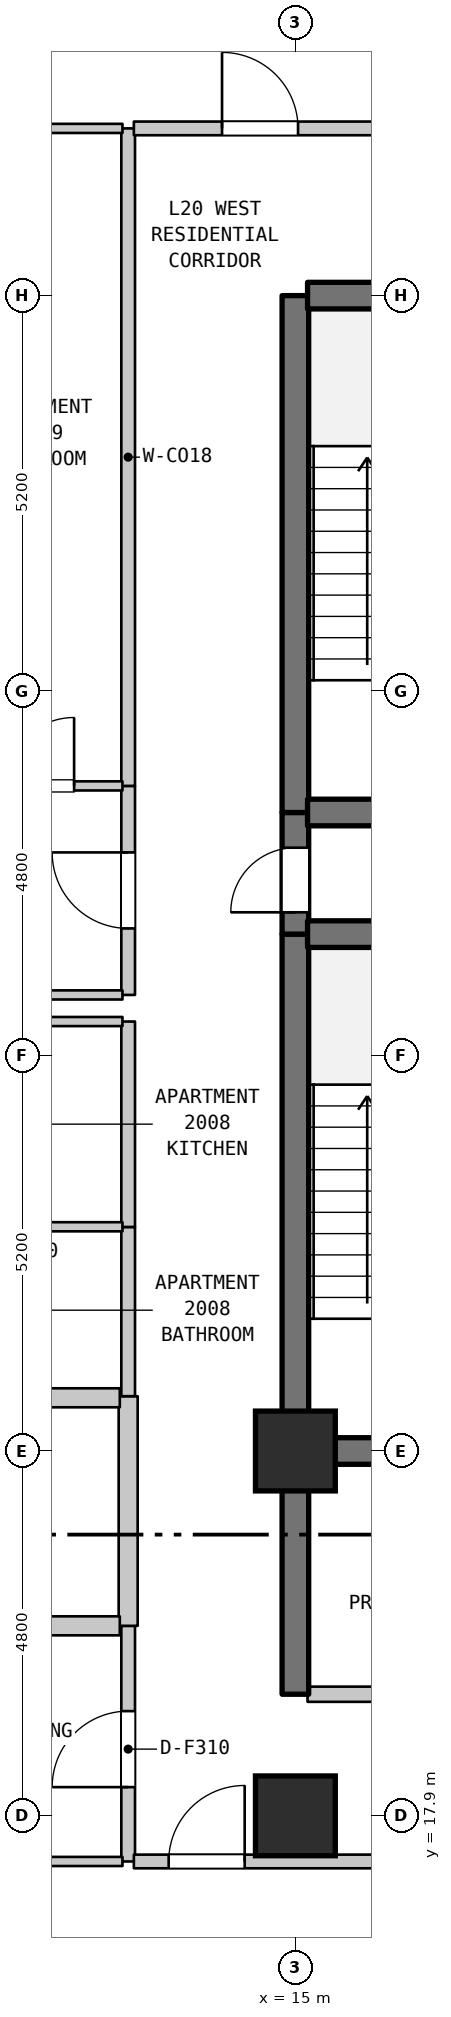
"""IFC4 building model, lengths in metres.
Left out: names, types, materials, properties, quantities, classifications, styles, units other than length and angle.
Written with IfcOpenShell. Run it as: python <this file> out.ifc"""

import sys

from ifc_helpers import new_model, si_unit, direction, frame, frame_2d, origin, origin_2d, place, context, subcontext, project, spatial, rectangle, extrude, element, fill, save


model = new_model("IFC4")
c1 = context("Model", 3, precision=1e-05, world=origin(), true_north=direction((0.0, 1.0)))
c2 = subcontext(c1, "Body", "Model", "MODEL_VIEW")
j1 = project(units=[si_unit("LENGTHUNIT", "METRE"), si_unit("PLANEANGLEUNIT", "RADIAN")], contexts=[c1])
p1 = place(None, origin())
s1 = spatial("IfcSite", under=j1, at=p1, CompositionType="ELEMENT")
p2 = place(p1, origin())
s2 = spatial("IfcBuilding", under=s1, at=p2, CompositionType="ELEMENT")
p3 = place(p2, frame((0.0, 0.0, 86.4)))
s3 = spatial("IfcBuildingStorey", under=s2, at=p3, CompositionType="ELEMENT", Elevation=86.4)
for number, where, z_axis, x_axis in (
    (1, (15.0, 17.9, 0.0), (0.0, 0.0, 1.0), (1.0, 0.0, 0.0)),
    (2, (15.0, 22.7, 0.0), (0.0, 0.0, 1.0), (1.0, 0.0, 0.0)),
):
    element("IfcColumn", number, at=place(p3, frame(where, z_axis=z_axis, x_axis=x_axis)), inside=s3, PredefinedType="COLUMN", context=c2, shape_type="SweptSolid", body=[
        extrude(rectangle(XDim=1.05, YDim=1.05, at=origin_2d()), origin(), (0.0, 0.0, 1.0), 4.5),
    ])
p4 = place(p3, frame((12.8, 17.3, 0.0), z_axis=(0.0, 0.0, 1.0), x_axis=(0.0, 1.0, 0.0)))
e3 = element("IfcWall", 3, at=p4, inside=s3, PredefinedType="STANDARD", context=c2, shape_type="SweptSolid", body=[
    extrude(rectangle(XDim=3.1, YDim=0.18, at=frame_2d((1.55, 0.0))), origin(), (0.0, 0.0, 1.0), 4.185),
])
p5 = place(p4, frame((0.978, 0.0, 0.0)))
e4 = element("IfcOpeningElement", 4, at=p5, cuts=e3, PredefinedType="OPENING", context=c2, shape_type="SweptSolid", body=[
    extrude(rectangle(XDim=1.0, YDim=2.15, at=frame_2d((0.5, 1.075))), frame((0.0, 0.1, 0.0), z_axis=(0.0, -1.0, 0.0), x_axis=(1.0, 0.0, 0.0)), (0.0, 0.0, 1.0), 0.2),
])
p6 = place(p3, frame((12.8, 20.4, 0.0), z_axis=(0.0, 0.0, 1.0), x_axis=(0.0, 1.0, 0.0)))
e5 = element("IfcWall", 5, at=p6, inside=s3, PredefinedType="STANDARD", context=c2, shape_type="SweptSolid", body=[
    extrude(rectangle(XDim=3.021, YDim=0.25, at=frame_2d((1.51, 0.0))), origin(), (0.0, 0.0, 1.0), 4.185),
])
p7 = place(p3, frame((12.8, 23.421, 0.0), z_axis=(0.0, 0.0, 1.0), x_axis=(0.0, 1.0, 0.0)))
e6 = element("IfcWall", 6, at=p7, inside=s3, PredefinedType="STANDARD", context=c2, shape_type="SweptSolid", body=[
    extrude(rectangle(XDim=2.226, YDim=0.18, at=frame_2d((1.113, 0.0))), origin(), (0.0, 0.0, 1.0), 4.185),
])
p8 = place(p3, frame((12.8, 25.647, 0.0), z_axis=(0.0, 0.0, 1.0), x_axis=(0.0, 1.0, 0.0)))
e7 = element("IfcWall", 7, at=p8, inside=s3, PredefinedType="STANDARD", context=c2, shape_type="SweptSolid", body=[
    extrude(rectangle(XDim=2.703, YDim=0.18, at=frame_2d((1.352, 0.0))), origin(), (0.0, 0.0, 1.0), 4.185),
])
p9 = place(p3, frame((12.8, 28.7, 0.0), z_axis=(0.0, 0.0, 1.0), x_axis=(0.0, 1.0, 0.0)))
e8 = element("IfcWall", 8, at=p9, inside=s3, PredefinedType="STANDARD", context=c2, shape_type="SweptSolid", body=[
    extrude(rectangle(XDim=2.75, YDim=0.18, at=frame_2d((1.375, 0.0))), origin(), (0.0, 0.0, 1.0), 4.185),
])
p10 = place(p9, frame((0.875, 0.0, 0.0)))
e9 = element("IfcOpeningElement", 9, at=p10, cuts=e8, PredefinedType="OPENING", context=c2, shape_type="SweptSolid", body=[
    extrude(rectangle(XDim=1.0, YDim=2.15, at=frame_2d((0.5, 1.075))), frame((0.0, 0.1, 0.0), z_axis=(0.0, -1.0, 0.0), x_axis=(1.0, 0.0, 0.0)), (0.0, 0.0, 1.0), 0.2),
])
p11 = place(p3, frame((12.8, 31.45, 0.0), z_axis=(0.0, 0.0, 1.0), x_axis=(0.0, 1.0, 0.0)))
e10 = element("IfcWall", 10, at=p11, inside=s3, PredefinedType="STANDARD", context=c2, shape_type="SweptSolid", body=[
    extrude(rectangle(XDim=8.65, YDim=0.18, at=frame_2d((4.325, 0.0))), origin(), (0.0, 0.0, 1.0), 4.185),
])
p12 = place(p3, frame((15.0, 19.5, 0.0), z_axis=(0.0, 0.0, 1.0), x_axis=(0.0, 1.0, 0.0)))
e11 = element("IfcWall", 11, at=p12, inside=s3, PredefinedType="SHEAR", context=c2, shape_type="SweptSolid", body=[
    extrude(rectangle(XDim=3.2, YDim=0.35, at=frame_2d((1.6, 0.0))), origin(), (0.0, 0.0, 1.0), 4.185),
])
p13 = place(p3, frame((15.0, 22.7, 0.0), z_axis=(0.0, 0.0, 1.0), x_axis=(0.0, 1.0, 0.0)))
e12 = element("IfcWall", 12, at=p13, inside=s3, PredefinedType="SHEAR", context=c2, shape_type="SweptSolid", body=[
    extrude(rectangle(XDim=6.8, YDim=0.35, at=frame_2d((3.4, 0.0))), origin(), (0.0, 0.0, 1.0), 4.185),
])
p14 = place(p3, frame((15.0, 29.5, 0.0), z_axis=(0.0, 0.0, 1.0), x_axis=(0.0, 1.0, 0.0)))
e13 = element("IfcWall", 13, at=p14, inside=s3, PredefinedType="SHEAR", context=c2, shape_type="SweptSolid", body=[
    extrude(rectangle(XDim=1.6, YDim=0.35, at=frame_2d((0.8, 0.0))), origin(), (0.0, 0.0, 1.0), 4.185),
])
p15 = place(p14, frame((0.287, 0.0, 0.0)))
e14 = element("IfcOpeningElement", 14, at=p15, cuts=e13, PredefinedType="OPENING", context=c2, shape_type="SweptSolid", body=[
    extrude(rectangle(XDim=0.85, YDim=2.1, at=frame_2d((0.425, 1.05))), frame((0.0, 0.185, 0.0), z_axis=(0.0, -1.0, 0.0), x_axis=(1.0, 0.0, 0.0)), (0.0, 0.0, 1.0), 0.37),
])
p16 = place(p3, frame((15.0, 31.1, 0.0), z_axis=(0.0, 0.0, 1.0), x_axis=(0.0, 1.0, 0.0)))
e15 = element("IfcWall", 15, at=p16, inside=s3, PredefinedType="SHEAR", context=c2, shape_type="SweptSolid", body=[
    extrude(rectangle(XDim=6.8, YDim=0.35, at=frame_2d((3.4, 0.0))), origin(), (0.0, 0.0, 1.0), 4.185),
])
p17 = place(p3, frame((9.085, 17.3, 0.0), z_axis=(0.0, 0.0, 1.0), x_axis=(1.0, 0.0, 0.0)))
e16 = element("IfcWall", 16, at=p17, inside=s3, PredefinedType="PARTITIONING", context=c2, shape_type="SweptSolid", body=[
    extrude(rectangle(XDim=3.64, YDim=0.12, at=frame_2d((1.82, 0.0))), origin(), (0.0, 0.0, 1.0), 4.185),
])
p18 = place(p3, frame((12.875, 17.3, 0.0), z_axis=(0.0, 0.0, 1.0), x_axis=(1.0, 0.0, 0.0)))
e17 = element("IfcWall", 17, at=p18, inside=s3, PredefinedType="STANDARD", context=c2, shape_type="SweptSolid", body=[
    extrude(rectangle(XDim=3.78, YDim=0.18, at=frame_2d((1.89, 0.0))), origin(), (0.0, 0.0, 1.0), 4.185),
])
p19 = place(p18, frame((0.458, 0.0, 0.0)))
e18 = element("IfcOpeningElement", 18, at=p19, cuts=e17, PredefinedType="OPENING", context=c2, shape_type="SweptSolid", body=[
    extrude(rectangle(XDim=1.0, YDim=2.15, at=frame_2d((0.5, 1.075))), frame((0.0, 0.1, 0.0), z_axis=(0.0, -1.0, 0.0), x_axis=(1.0, 0.0, 0.0)), (0.0, 0.0, 1.0), 0.2),
])
p20 = place(p3, frame((15.16, 19.5, 0.0), z_axis=(0.0, 0.0, 1.0), x_axis=(1.0, 0.0, 0.0)))
e19 = element("IfcWall", 19, at=p20, inside=s3, PredefinedType="STANDARD", context=c2, shape_type="SweptSolid", body=[
    extrude(rectangle(XDim=3.68, YDim=0.2, at=frame_2d((1.84, 0.0))), origin(), (0.0, 0.0, 1.0), 4.185),
])
p21 = place(p20, frame((1.39, 0.0, 0.0)))
e20 = element("IfcOpeningElement", 20, at=p21, cuts=e19, PredefinedType="OPENING", context=c2, shape_type="SweptSolid", body=[
    extrude(rectangle(XDim=0.9, YDim=2.15, at=frame_2d((0.45, 1.075))), frame((0.0, 0.11, 0.0), z_axis=(0.0, -1.0, 0.0), x_axis=(1.0, 0.0, 0.0)), (0.0, 0.0, 1.0), 0.22),
])
p22 = place(p3, frame((10.66, 20.4, 0.0), z_axis=(0.0, 0.0, 1.0), x_axis=(1.0, 0.0, 0.0)))
e21 = element("IfcWall", 21, at=p22, inside=s3, PredefinedType="STANDARD", context=c2, shape_type="SweptSolid", body=[
    extrude(rectangle(XDim=2.03, YDim=0.25, at=frame_2d((1.015, 0.0))), origin(), (0.0, 0.0, 1.0), 4.185),
])
p23 = place(p3, frame((15.16, 22.7, 0.0), z_axis=(0.0, 0.0, 1.0), x_axis=(1.0, 0.0, 0.0)))
e22 = element("IfcWall", 22, at=p23, inside=s3, PredefinedType="SHEAR", context=c2, shape_type="SweptSolid", body=[
    extrude(rectangle(XDim=3.68, YDim=0.35, at=frame_2d((1.84, 0.0))), origin(), (0.0, 0.0, 1.0), 4.185),
])
p24 = place(p3, frame((10.66, 23.4, 0.0), z_axis=(0.0, 0.0, 1.0), x_axis=(1.0, 0.0, 0.0)))
e23 = element("IfcWall", 23, at=p24, inside=s3, PredefinedType="STANDARD", context=c2, shape_type="SweptSolid", body=[
    extrude(rectangle(XDim=2.03, YDim=0.25, at=frame_2d((1.015, 0.0))), origin(), (0.0, 0.0, 1.0), 4.185),
])
for number, where, z_axis, x_axis in (
    (24, (10.595, 25.65, 0.0), (0.0, 0.0, 1.0), (1.0, 0.0, 0.0)),
    (25, (10.595, 28.35, 0.0), (0.0, 0.0, 1.0), (1.0, 0.0, 0.0)),
):
    element("IfcWall", number, at=place(p3, frame(where, z_axis=z_axis, x_axis=x_axis)), inside=s3, PredefinedType="PARTITIONING", context=c2, shape_type="SweptSolid", body=[
        extrude(rectangle(XDim=2.13, YDim=0.12, at=frame_2d((1.065, 0.0))), origin(), (0.0, 0.0, 1.0), 4.185),
    ])
p25 = place(p3, frame((9.03, 28.7, 0.0), z_axis=(0.0, 0.0, 1.0), x_axis=(1.0, 0.0, 0.0)))
e26 = element("IfcWall", 26, at=p25, inside=s3, PredefinedType="PARTITIONING", context=c2, shape_type="SweptSolid", body=[
    extrude(rectangle(XDim=3.695, YDim=0.12, at=frame_2d((1.848, 0.0))), origin(), (0.0, 0.0, 1.0), 4.185),
])
for number, where, z_axis, x_axis in (
    (27, (15.16, 29.5, 0.0), (0.0, 0.0, 1.0), (1.0, 0.0, 0.0)),
    (28, (15.16, 31.1, 0.0), (0.0, 0.0, 1.0), (1.0, 0.0, 0.0)),
):
    element("IfcWall", number, at=place(p3, frame(where, z_axis=z_axis, x_axis=x_axis)), inside=s3, PredefinedType="SHEAR", context=c2, shape_type="SweptSolid", body=[
        extrude(rectangle(XDim=3.68, YDim=0.35, at=frame_2d((1.84, 0.0))), origin(), (0.0, 0.0, 1.0), 4.185),
    ])
p26 = place(p3, frame((10.523, 31.45, 0.0), z_axis=(0.0, 0.0, 1.0), x_axis=(1.0, 0.0, 0.0)))
e29 = element("IfcWall", 29, at=p26, inside=s3, PredefinedType="PARTITIONING", context=c2, shape_type="SweptSolid", body=[
    extrude(rectangle(XDim=2.202, YDim=0.12, at=frame_2d((1.101, 0.0))), origin(), (0.0, 0.0, 1.0), 4.185),
])
p27 = place(p26, frame((0.666, 0.0, 0.0)))
e30 = element("IfcOpeningElement", 30, at=p27, cuts=e29, PredefinedType="OPENING", context=c2, shape_type="SweptSolid", body=[
    extrude(rectangle(XDim=0.9, YDim=2.1, at=frame_2d((0.45, 1.05))), frame((0.0, 0.07, 0.0), z_axis=(0.0, -1.0, 0.0), x_axis=(1.0, 0.0, 0.0)), (0.0, 0.0, 1.0), 0.14),
])
p28 = place(p3, frame((15.16, 37.9, 0.0), z_axis=(0.0, 0.0, 1.0), x_axis=(1.0, 0.0, 0.0)))
e31 = element("IfcWall", 31, at=p28, inside=s3, PredefinedType="SHEAR", context=c2, shape_type="SweptSolid", body=[
    extrude(rectangle(XDim=3.68, YDim=0.35, at=frame_2d((1.84, 0.0))), origin(), (0.0, 0.0, 1.0), 4.185),
])
p29 = place(p3, frame((10.523, 40.1, 0.0), z_axis=(0.0, 0.0, 1.0), x_axis=(1.0, 0.0, 0.0)))
e32 = element("IfcWall", 32, at=p29, inside=s3, PredefinedType="PARTITIONING", context=c2, shape_type="SweptSolid", body=[
    extrude(rectangle(XDim=2.202, YDim=0.12, at=frame_2d((1.101, 0.0))), origin(), (0.0, 0.0, 1.0), 4.185),
])
p30 = place(p3, frame((12.875, 40.1, 0.0), z_axis=(0.0, 0.0, 1.0), x_axis=(1.0, 0.0, 0.0)))
e33 = element("IfcWall", 33, at=p30, inside=s3, PredefinedType="STANDARD", context=c2, shape_type="SweptSolid", body=[
    extrude(rectangle(XDim=3.49, YDim=0.18, at=frame_2d((1.745, 0.0))), origin(), (0.0, 0.0, 1.0), 4.185),
])
p31 = place(p30, frame((1.16, 0.0, 0.0)))
e34 = element("IfcOpeningElement", 34, at=p31, cuts=e33, PredefinedType="OPENING", context=c2, shape_type="SweptSolid", body=[
    extrude(rectangle(XDim=1.0, YDim=2.15, at=frame_2d((0.5, 1.075))), frame((0.0, 0.1, 0.0), z_axis=(0.0, -1.0, 0.0), x_axis=(1.0, 0.0, 0.0)), (0.0, 0.0, 1.0), 0.2),
])
p32 = place(p5, origin())
e35 = element("IfcDoor", 35, at=p32, inside=s3, OperationType="SINGLE_SWING_LEFT", PredefinedType="DOOR", context=c2, shape_type="SweptSolid", body=[
    extrude(rectangle(XDim=1.0, YDim=2.15, at=frame_2d((0.5, 1.075))), frame((0.0, 0.025, 0.0), z_axis=(0.0, -1.0, 0.0), x_axis=(1.0, 0.0, 0.0)), (0.0, 0.0, 1.0), 0.05),
])
fill(e4, e35)
p33 = place(p10, origin())
e36 = element("IfcDoor", 36, at=p33, inside=s3, OperationType="SINGLE_SWING_RIGHT", PredefinedType="DOOR", context=c2, shape_type="SweptSolid", body=[
    extrude(rectangle(XDim=1.0, YDim=2.15, at=frame_2d((0.5, 1.075))), frame((0.0, 0.025, 0.0), z_axis=(0.0, -1.0, 0.0), x_axis=(1.0, 0.0, 0.0)), (0.0, 0.0, 1.0), 0.05),
])
fill(e9, e36)
p34 = place(p15, origin())
e37 = element("IfcDoor", 37, at=p34, inside=s3, OperationType="SINGLE_SWING_LEFT", PredefinedType="DOOR", context=c2, shape_type="SweptSolid", body=[
    extrude(rectangle(XDim=0.85, YDim=2.1, at=frame_2d((0.425, 1.05))), frame((0.0, 0.025, 0.0), z_axis=(0.0, -1.0, 0.0), x_axis=(1.0, 0.0, 0.0)), (0.0, 0.0, 1.0), 0.05),
])
fill(e14, e37)
p35 = place(p19, origin())
e38 = element("IfcDoor", 38, at=p35, inside=s3, OperationType="SINGLE_SWING_RIGHT", PredefinedType="DOOR", context=c2, shape_type="SweptSolid", body=[
    extrude(rectangle(XDim=1.0, YDim=2.15, at=frame_2d((0.5, 1.075))), frame((0.0, 0.025, 0.0), z_axis=(0.0, -1.0, 0.0), x_axis=(1.0, 0.0, 0.0)), (0.0, 0.0, 1.0), 0.05),
])
fill(e18, e38)
p36 = place(p27, origin())
e39 = element("IfcDoor", 39, at=p36, inside=s3, OperationType="SINGLE_SWING_RIGHT", PredefinedType="DOOR", context=c2, shape_type="SweptSolid", body=[
    extrude(rectangle(XDim=0.9, YDim=2.1, at=frame_2d((0.45, 1.05))), frame((0.0, 0.025, 0.0), z_axis=(0.0, -1.0, 0.0), x_axis=(1.0, 0.0, 0.0)), (0.0, 0.0, 1.0), 0.05),
])
fill(e30, e39)
p37 = place(p31, origin())
e40 = element("IfcDoor", 40, at=p37, inside=s3, OperationType="SINGLE_SWING_LEFT", PredefinedType="DOOR", context=c2, shape_type="SweptSolid", body=[
    extrude(rectangle(XDim=1.0, YDim=2.15, at=frame_2d((0.5, 1.075))), frame((0.0, 0.025, 0.0), z_axis=(0.0, -1.0, 0.0), x_axis=(1.0, 0.0, 0.0)), (0.0, 0.0, 1.0), 0.05),
])
fill(e34, e40)
save(model, sys.argv[1])
